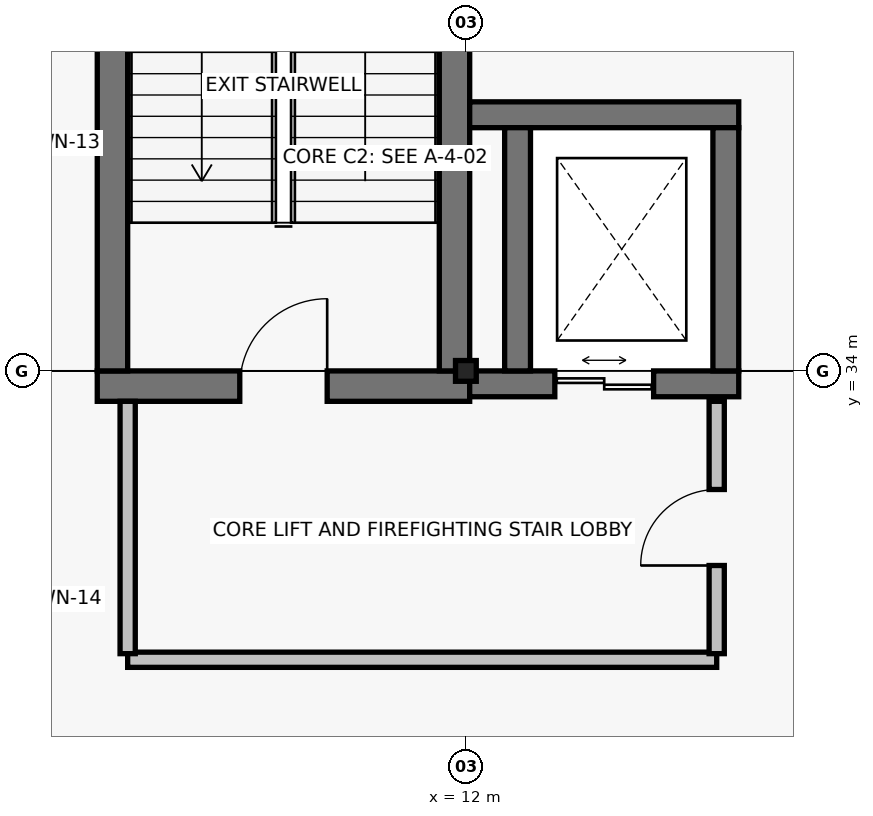
"""IFC4 building model, lengths in metres.
Left out: names, types, materials, properties, quantities, classifications, styles, units other than length and angle.
Written with IfcOpenShell. Run it as: python <this file> out.ifc"""

import sys

from ifc_helpers import new_model, si_unit, direction, frame, frame_2d, origin, origin_2d, place, context, subcontext, project, spatial, rectangle, hollow_circle, extrude, element, fill, save


model = new_model("IFC4")
c1 = context("Model", 3, precision=1e-05, world=origin(), true_north=direction((0.0, 1.0)))
c2 = subcontext(c1, "Body", "Model", "MODEL_VIEW")
j1 = project(units=[si_unit("LENGTHUNIT", "METRE"), si_unit("PLANEANGLEUNIT", "RADIAN")], contexts=[c1])
p1 = place(None, origin())
s1 = spatial("IfcSite", under=j1, at=p1, CompositionType="ELEMENT")
p2 = place(p1, origin())
s2 = spatial("IfcBuilding", under=s1, at=p2, CompositionType="ELEMENT")
p3 = place(p2, frame((0.0, 0.0, 23.6)))
s3 = spatial("IfcBuildingStorey", under=s2, at=p3, CompositionType="ELEMENT", Elevation=23.6)
p4 = place(p3, frame((12.0, 34.0, 0.0), z_axis=(0.0, 0.0, 1.0), x_axis=(1.0, 0.0, 0.0)))
e1 = element("IfcColumn", 1, at=p4, inside=s3, PredefinedType="COLUMN", context=c2, shape_type="SweptSolid", body=[
    extrude(hollow_circle(Radius=0.136, WallThickness=0.01, at=origin_2d()), origin(), (0.0, 0.0, 1.0), 5.0),
])
p5 = place(p3, frame((7.15, 33.8, 0.0), z_axis=(0.0, 0.0, 1.0), x_axis=(1.0, 0.0, 0.0)))
e2 = element("IfcWall", 2, at=p5, inside=s3, PredefinedType="SHEAR", context=c2, shape_type="SweptSolid", body=[
    extrude(rectangle(XDim=4.9, YDim=0.4, at=frame_2d((2.45, 0.0))), origin(), (0.0, 0.0, 1.0), 4.75),
])
p6 = place(p5, frame((1.875, 0.0, 0.0)))
e3 = element("IfcOpeningElement", 3, at=p6, cuts=e2, PredefinedType="OPENING", context=c2, shape_type="SweptSolid", body=[
    extrude(rectangle(XDim=1.15, YDim=2.15, at=frame_2d((0.575, 1.075))), frame((0.0, 0.215, 0.0), z_axis=(0.0, -1.0, 0.0), x_axis=(1.0, 0.0, 0.0)), (0.0, 0.0, 1.0), 0.43),
])
for number, where, z_axis, x_axis in (
    (4, (7.35, 43.4, 0.0), (0.0, 0.0, 1.0), (0.0, -1.0, 0.0)),
    (5, (11.85, 34.0, 0.0), (0.0, 0.0, 1.0), (0.0, 1.0, 0.0)),
):
    element("IfcWall", number, at=place(p3, frame(where, z_axis=z_axis, x_axis=x_axis)), inside=s3, PredefinedType="SHEAR", context=c2, shape_type="SweptSolid", body=[
        extrude(rectangle(XDim=9.4, YDim=0.4, at=frame_2d((4.7, 0.0))), origin(), (0.0, 0.0, 1.0), 4.75),
    ])
p7 = place(p3, frame((12.05, 33.83, 0.0), z_axis=(0.0, 0.0, 1.0), x_axis=(1.0, 0.0, 0.0)))
e6 = element("IfcWall", 6, at=p7, inside=s3, PredefinedType="SHEAR", context=c2, shape_type="SweptSolid", body=[
    extrude(rectangle(XDim=3.54, YDim=0.34, at=frame_2d((1.77, 0.0))), origin(), (0.0, 0.0, 1.0), 4.75),
])
p8 = place(p7, frame((1.12, 0.0, 0.0)))
e7 = element("IfcOpeningElement", 7, at=p8, cuts=e6, PredefinedType="OPENING", context=c2, shape_type="SweptSolid", body=[
    extrude(rectangle(XDim=1.3, YDim=2.25, at=frame_2d((0.65, 1.125))), frame((0.0, 0.185, 0.0), z_axis=(0.0, -1.0, 0.0), x_axis=(1.0, 0.0, 0.0)), (0.0, 0.0, 1.0), 0.37),
])
p9 = place(p3, frame((15.59, 37.37, 0.0), z_axis=(0.0, 0.0, 1.0), x_axis=(-1.0, 0.0, 0.0)))
e8 = element("IfcWall", 8, at=p9, inside=s3, PredefinedType="SHEAR", context=c2, shape_type="SweptSolid", body=[
    extrude(rectangle(XDim=3.54, YDim=0.34, at=frame_2d((1.77, 0.0))), origin(), (0.0, 0.0, 1.0), 4.75),
])
for number, where, z_axis, x_axis in (
    (9, (12.68, 37.2, 0.0), (0.0, 0.0, 1.0), (0.0, -1.0, 0.0)),
    (10, (15.42, 34.0, 0.0), (0.0, 0.0, 1.0), (0.0, 1.0, 0.0)),
):
    element("IfcWall", number, at=place(p3, frame(where, z_axis=z_axis, x_axis=x_axis)), inside=s3, PredefinedType="SHEAR", context=c2, shape_type="SweptSolid", body=[
        extrude(rectangle(XDim=3.2, YDim=0.34, at=frame_2d((1.6, 0.0))), origin(), (0.0, 0.0, 1.0), 4.75),
    ])
p10 = place(p3, frame((7.55, 30.2, 0.0), z_axis=(0.0, 0.0, 1.0), x_axis=(1.0, 0.0, 0.0)))
e11 = element("IfcWall", 11, at=p10, inside=s3, PredefinedType="PARTITIONING", context=c2, shape_type="SweptSolid", body=[
    extrude(rectangle(XDim=7.75, YDim=0.2, at=frame_2d((3.875, 0.0))), origin(), (0.0, 0.0, 1.0), 4.181),
])
p11 = place(p3, frame((7.55, 33.6, 0.0), z_axis=(0.0, 0.0, 1.0), x_axis=(0.0, -1.0, 0.0)))
e12 = element("IfcWall", 12, at=p11, inside=s3, PredefinedType="PARTITIONING", context=c2, shape_type="SweptSolid", body=[
    extrude(rectangle(XDim=3.32, YDim=0.2, at=frame_2d((1.66, 0.0))), origin(), (0.0, 0.0, 1.0), 4.75),
])
p12 = place(p3, frame((15.3, 30.28, 0.0), z_axis=(0.0, 0.0, 1.0), x_axis=(0.0, 1.0, 0.0)))
e13 = element("IfcWall", 13, at=p12, inside=s3, PredefinedType="PARTITIONING", context=c2, shape_type="SweptSolid", body=[
    extrude(rectangle(XDim=3.32, YDim=0.2, at=frame_2d((1.66, 0.0))), origin(), (0.0, 0.0, 1.0), 4.75),
])
p13 = place(p12, frame((1.16, 0.0, 0.0)))
e14 = element("IfcOpeningElement", 14, at=p13, cuts=e13, PredefinedType="OPENING", context=c2, shape_type="SweptSolid", body=[
    extrude(rectangle(XDim=1.0, YDim=2.15, at=frame_2d((0.5, 1.075))), frame((0.0, 0.115, 0.0), z_axis=(0.0, -1.0, 0.0), x_axis=(1.0, 0.0, 0.0)), (0.0, 0.0, 1.0), 0.23),
])
p14 = place(p6, origin())
e15 = element("IfcDoor", 15, at=p14, inside=s3, OperationType="SINGLE_SWING_RIGHT", PredefinedType="DOOR", context=c2, shape_type="SweptSolid", body=[
    extrude(rectangle(XDim=1.15, YDim=2.15, at=frame_2d((0.575, 1.075))), frame((0.0, 0.025, 0.0), z_axis=(0.0, -1.0, 0.0), x_axis=(1.0, 0.0, 0.0)), (0.0, 0.0, 1.0), 0.05),
])
fill(e3, e15)
p15 = place(p8, origin())
e16 = element("IfcDoor", 16, at=p15, inside=s3, OperationType="DOUBLE_DOOR_SLIDING", PredefinedType="DOOR", context=c2, shape_type="SweptSolid", body=[
    extrude(rectangle(XDim=1.3, YDim=2.25, at=frame_2d((0.65, 1.125))), frame((0.0, 0.025, 0.0), z_axis=(0.0, -1.0, 0.0), x_axis=(1.0, 0.0, 0.0)), (0.0, 0.0, 1.0), 0.05),
])
fill(e7, e16)
p16 = place(p13, origin())
e17 = element("IfcDoor", 17, at=p16, inside=s3, OperationType="SINGLE_SWING_LEFT", PredefinedType="DOOR", context=c2, shape_type="SweptSolid", body=[
    extrude(rectangle(XDim=1.0, YDim=2.15, at=frame_2d((0.5, 1.075))), frame((0.0, 0.025, 0.0), z_axis=(0.0, -1.0, 0.0), x_axis=(1.0, 0.0, 0.0)), (0.0, 0.0, 1.0), 0.05),
])
fill(e14, e17)
save(model, sys.argv[1])
